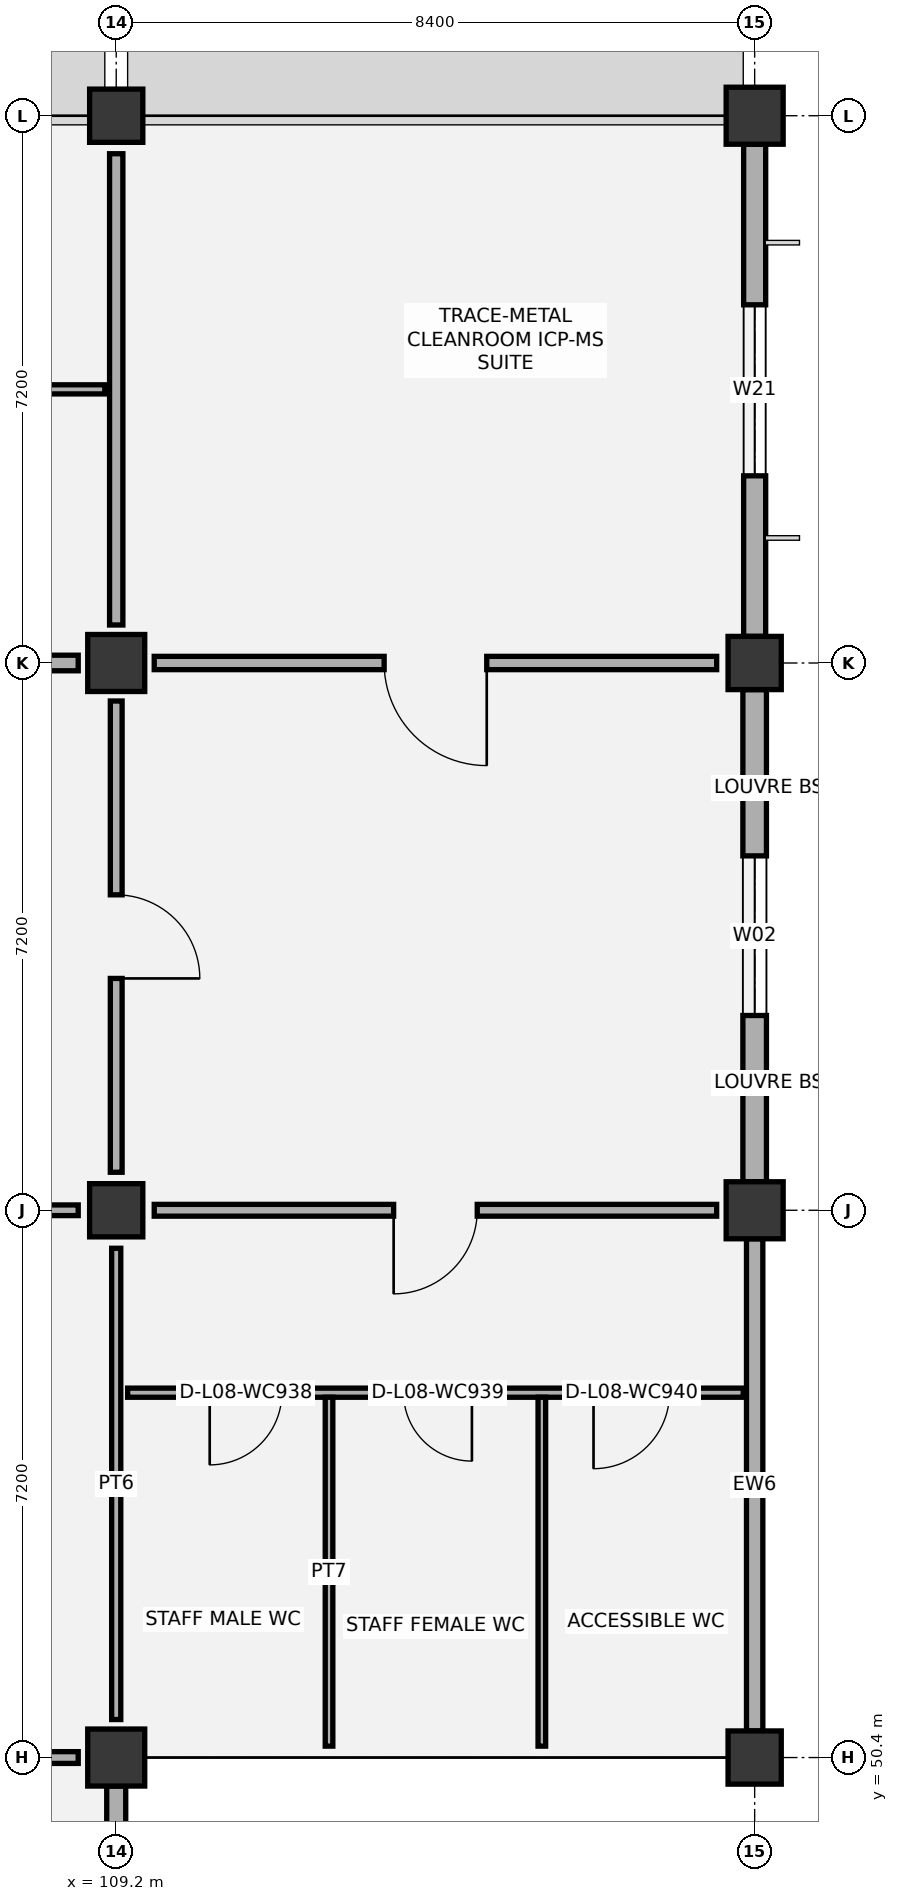
"""IFC4 building model, lengths in metres.
Left out: names, types, materials, properties, quantities, classifications, styles, units other than length and angle.
Written with IfcOpenShell. Run it as: python <this file> out.ifc"""

import sys

from ifc_helpers import new_model, si_unit, direction, frame, frame_2d, origin, origin_2d, place, context, subcontext, project, spatial, rectangle, extrude, element, fill, save


model = new_model("IFC4")
c1 = context("Model", 3, precision=1e-05, world=origin(), true_north=direction((0.0, 1.0)))
c2 = subcontext(c1, "Body", "Model", "MODEL_VIEW")
j1 = project(units=[si_unit("LENGTHUNIT", "METRE"), si_unit("PLANEANGLEUNIT", "RADIAN")], contexts=[c1])
p1 = place(None, origin())
s1 = spatial("IfcSite", under=j1, at=p1, CompositionType="ELEMENT")
p2 = place(p1, origin())
s2 = spatial("IfcBuilding", under=s1, at=p2, CompositionType="ELEMENT")
p3 = place(p2, frame((0.0, 0.0, 39.6)))
s3 = spatial("IfcBuildingStorey", under=s2, at=p3, CompositionType="ELEMENT", Elevation=39.6)
p4 = place(p3, frame((109.2, 50.4, 0.0), z_axis=(0.0, 0.0, 1.0), x_axis=(1.0, 0.0, 0.0)))
e1 = element("IfcColumn", 1, at=p4, inside=s3, PredefinedType="COLUMN", context=c2, shape_type="SweptSolid", body=[
    extrude(rectangle(XDim=0.75, YDim=0.75, at=origin_2d()), origin(), (0.0, 0.0, 1.0), 4.2),
])
p5 = place(p3, frame((109.2, 57.6, 0.0), z_axis=(0.0, 0.0, 1.0), x_axis=(1.0, 0.0, 0.0)))
e2 = element("IfcColumn", 2, at=p5, inside=s3, PredefinedType="COLUMN", context=c2, shape_type="SweptSolid", body=[
    extrude(rectangle(XDim=0.7, YDim=0.7, at=origin_2d()), origin(), (0.0, 0.0, 1.0), 4.2),
])
p6 = place(p3, frame((109.2, 64.8, 0.0), z_axis=(0.0, 0.0, 1.0), x_axis=(1.0, 0.0, 0.0)))
e3 = element("IfcColumn", 3, at=p6, inside=s3, PredefinedType="COLUMN", context=c2, shape_type="SweptSolid", body=[
    extrude(rectangle(XDim=0.75, YDim=0.75, at=origin_2d()), origin(), (0.0, 0.0, 1.0), 4.2),
])
for number, where, z_axis, x_axis in (
    (4, (109.2, 72.0, 0.0), (0.0, 0.0, 1.0), (1.0, 0.0, 0.0)),
    (5, (117.6, 50.4, 0.0), (0.0, 0.0, 1.0), (1.0, 0.0, 0.0)),
):
    element("IfcColumn", number, at=place(p3, frame(where, z_axis=z_axis, x_axis=x_axis)), inside=s3, PredefinedType="COLUMN", context=c2, shape_type="SweptSolid", body=[
        extrude(rectangle(XDim=0.7, YDim=0.7, at=origin_2d()), origin(), (0.0, 0.0, 1.0), 4.2),
    ])
p7 = place(p3, frame((117.6, 57.6, 0.0), z_axis=(0.0, 0.0, 1.0), x_axis=(1.0, 0.0, 0.0)))
e6 = element("IfcColumn", 6, at=p7, inside=s3, PredefinedType="COLUMN", context=c2, shape_type="SweptSolid", body=[
    extrude(rectangle(XDim=0.75, YDim=0.75, at=origin_2d()), origin(), (0.0, 0.0, 1.0), 4.2),
])
p8 = place(p3, frame((117.6, 64.8, 0.0), z_axis=(0.0, 0.0, 1.0), x_axis=(1.0, 0.0, 0.0)))
e7 = element("IfcColumn", 7, at=p8, inside=s3, PredefinedType="COLUMN", context=c2, shape_type="SweptSolid", body=[
    extrude(rectangle(XDim=0.7, YDim=0.7, at=origin_2d()), origin(), (0.0, 0.0, 1.0), 4.2),
])
p9 = place(p3, frame((117.6, 72.0, 0.0), z_axis=(0.0, 0.0, 1.0), x_axis=(1.0, 0.0, 0.0)))
e8 = element("IfcColumn", 8, at=p9, inside=s3, PredefinedType="COLUMN", context=c2, shape_type="SweptSolid", body=[
    extrude(rectangle(XDim=0.75, YDim=0.75, at=origin_2d()), origin(), (0.0, 0.0, 1.0), 4.2),
])
p10 = place(p3, frame((109.2, 43.55, 0.0), z_axis=(0.0, 0.0, 1.0), x_axis=(0.0, 1.0, 0.0)))
e9 = element("IfcWall", 9, at=p10, inside=s3, PredefinedType="SOLIDWALL", context=c2, shape_type="SweptSolid", body=[
    extrude(rectangle(XDim=6.475, YDim=0.25, at=frame_2d((3.237, 0.0))), origin(), (0.0, 0.0, 1.0), 3.345),
])
p11 = place(p10, frame((1.358, 0.0, 0.9)))
e10 = element("IfcOpeningElement", 10, at=p11, cuts=e9, PredefinedType="OPENING", context=c2, shape_type="SweptSolid", body=[
    extrude(rectangle(XDim=1.2, YDim=1.8, at=frame_2d((0.6, 0.9))), frame((0.0, 0.135, 0.0), z_axis=(0.0, -1.0, 0.0), x_axis=(1.0, 0.0, 0.0)), (0.0, 0.0, 1.0), 0.27),
])
p12 = place(p10, frame((3.917, 0.0, 0.9)))
e11 = element("IfcOpeningElement", 11, at=p12, cuts=e9, PredefinedType="OPENING", context=c2, shape_type="SweptSolid", body=[
    extrude(rectangle(XDim=1.2, YDim=1.8, at=frame_2d((0.6, 0.9))), frame((0.0, 0.135, 0.0), z_axis=(0.0, -1.0, 0.0), x_axis=(1.0, 0.0, 0.0)), (0.0, 0.0, 1.0), 0.27),
])
p13 = place(p3, frame((117.6, 50.75, 0.0), z_axis=(0.0, 0.0, 1.0), x_axis=(0.0, 1.0, 0.0)))
e12 = element("IfcWall", 12, at=p13, inside=s3, PredefinedType="SOLIDWALL", context=c2, shape_type="SweptSolid", body=[
    extrude(rectangle(XDim=6.475, YDim=0.215, at=frame_2d((3.238, 0.0))), origin(), (0.0, 0.0, 1.0), 3.345),
])
p14 = place(p3, frame((117.6, 57.975, 0.0), z_axis=(0.0, 0.0, 1.0), x_axis=(0.0, 1.0, 0.0)))
e13 = element("IfcWall", 13, at=p14, inside=s3, PredefinedType="SOLIDWALL", context=c2, shape_type="SweptSolid", body=[
    extrude(rectangle(XDim=6.475, YDim=0.31, at=frame_2d((3.237, 0.0))), origin(), (0.0, 0.0, 1.0), 3.345),
])
p15 = place(p14, frame((2.188, 0.0, 0.9)))
e14 = element("IfcOpeningElement", 14, at=p15, cuts=e13, PredefinedType="OPENING", context=c2, shape_type="SweptSolid", body=[
    extrude(rectangle(XDim=2.1, YDim=1.8, at=frame_2d((1.05, 0.9))), frame((0.0, 0.165, 0.0), z_axis=(0.0, -1.0, 0.0), x_axis=(1.0, 0.0, 0.0)), (0.0, 0.0, 1.0), 0.33),
])
p16 = place(p3, frame((117.6, 65.15, 0.0), z_axis=(0.0, 0.0, 1.0), x_axis=(0.0, 1.0, 0.0)))
e15 = element("IfcWall", 15, at=p16, inside=s3, PredefinedType="SOLIDWALL", context=c2, shape_type="SweptSolid", body=[
    extrude(rectangle(XDim=6.475, YDim=0.29, at=frame_2d((3.238, 0.0))), origin(), (0.0, 0.0, 1.0), 3.345),
])
p17 = place(p16, frame((2.113, 0.0, 0.9)))
e16 = element("IfcOpeningElement", 16, at=p17, cuts=e15, PredefinedType="OPENING", context=c2, shape_type="SweptSolid", body=[
    extrude(rectangle(XDim=2.25, YDim=1.95, at=frame_2d((1.125, 0.975))), frame((0.0, 0.155, 0.0), z_axis=(0.0, -1.0, 0.0), x_axis=(1.0, 0.0, 0.0)), (0.0, 0.0, 1.0), 0.31),
])
p18 = place(p3, frame((109.35, 55.2, 0.0), z_axis=(0.0, 0.0, 1.0), x_axis=(1.0, 0.0, 0.0)))
e17 = element("IfcWall", 17, at=p18, inside=s3, PredefinedType="PARTITIONING", context=c2, shape_type="SweptSolid", body=[
    extrude(rectangle(XDim=8.1, YDim=0.12, at=frame_2d((4.05, 0.0))), origin(), (0.0, 0.0, 1.0), 3.9),
])
p19 = place(p18, frame((1.08, 0.0, 0.0)))
e18 = element("IfcOpeningElement", 18, at=p19, cuts=e17, PredefinedType="OPENING", context=c2, shape_type="SweptSolid", body=[
    extrude(rectangle(XDim=0.95, YDim=2.1, at=frame_2d((0.475, 1.05))), frame((0.0, 0.07, 0.0), z_axis=(0.0, -1.0, 0.0), x_axis=(1.0, 0.0, 0.0)), (0.0, 0.0, 1.0), 0.14),
])
p20 = place(p18, frame((3.63, 0.0, 0.0)))
e19 = element("IfcOpeningElement", 19, at=p20, cuts=e17, PredefinedType="OPENING", context=c2, shape_type="SweptSolid", body=[
    extrude(rectangle(XDim=0.9, YDim=2.1, at=frame_2d((0.45, 1.05))), frame((0.0, 0.07, 0.0), z_axis=(0.0, -1.0, 0.0), x_axis=(1.0, 0.0, 0.0)), (0.0, 0.0, 1.0), 0.14),
])
p21 = place(p18, frame((6.13, 0.0, 0.0)))
e20 = element("IfcOpeningElement", 20, at=p21, cuts=e17, PredefinedType="OPENING", context=c2, shape_type="SweptSolid", body=[
    extrude(rectangle(XDim=1.0, YDim=2.1, at=frame_2d((0.5, 1.05))), frame((0.0, 0.07, 0.0), z_axis=(0.0, -1.0, 0.0), x_axis=(1.0, 0.0, 0.0)), (0.0, 0.0, 1.0), 0.14),
])
for number, where, z_axis, x_axis in (
    (21, (112.0, 50.55, 0.0), (0.0, 0.0, 1.0), (0.0, 1.0, 0.0)),
    (22, (114.8, 50.55, 0.0), (0.0, 0.0, 1.0), (0.0, 1.0, 0.0)),
):
    element("IfcWall", number, at=place(p3, frame(where, z_axis=z_axis, x_axis=x_axis)), inside=s3, PredefinedType="PARTITIONING", context=c2, shape_type="SweptSolid", body=[
        extrude(rectangle(XDim=4.59, YDim=0.1, at=frame_2d((2.295, 0.0))), origin(), (0.0, 0.0, 1.0), 3.9),
    ])
p22 = place(p3, frame((100.95, 68.4, 0.0), z_axis=(0.0, 0.0, 1.0), x_axis=(1.0, 0.0, 0.0)))
e23 = element("IfcWall", 23, at=p22, inside=s3, PredefinedType="PARTITIONING", context=c2, shape_type="SweptSolid", body=[
    extrude(rectangle(XDim=8.1, YDim=0.12, at=frame_2d((4.05, 0.0))), origin(), (0.0, 0.0, 1.0), 3.9),
])
p23 = place(p22, frame((3.55, 0.0, 0.0)))
e24 = element("IfcOpeningElement", 24, at=p23, cuts=e23, PredefinedType="OPENING", context=c2, shape_type="SweptSolid", body=[
    extrude(rectangle(XDim=1.6, YDim=2.2, at=frame_2d((0.8, 1.1))), frame((0.0, 0.07, 0.0), z_axis=(0.0, -1.0, 0.0), x_axis=(1.0, 0.0, 0.0)), (0.0, 0.0, 1.0), 0.14),
])
p24 = place(p3, frame((101.3, 50.4, 0.0), z_axis=(0.0, 0.0, 1.0), x_axis=(1.0, 0.0, 0.0)))
e25 = element("IfcWall", 25, at=p24, inside=s3, PredefinedType="PARTITIONING", context=c2, shape_type="SweptSolid", body=[
    extrude(rectangle(XDim=7.4, YDim=0.155, at=frame_2d((3.7, 0.0))), origin(), (0.0, 0.0, 1.0), 3.295),
])
p25 = place(p24, frame((3.15, 0.0, 0.0)))
e26 = element("IfcOpeningElement", 26, at=p25, cuts=e25, PredefinedType="OPENING", context=c2, shape_type="SweptSolid", body=[
    extrude(rectangle(XDim=1.1, YDim=2.1, at=frame_2d((0.55, 1.05))), frame((0.0, 0.087, 0.0), z_axis=(0.0, -1.0, 0.0), x_axis=(1.0, 0.0, 0.0)), (0.0, 0.0, 1.0), 0.175),
])
p26 = place(p3, frame((109.2, 50.9, 0.0), z_axis=(0.0, 0.0, 1.0), x_axis=(0.0, 1.0, 0.0)))
e27 = element("IfcWall", 27, at=p26, inside=s3, PredefinedType="PARTITIONING", context=c2, shape_type="SweptSolid", body=[
    extrude(rectangle(XDim=6.2, YDim=0.12, at=frame_2d((3.1, 0.0))), origin(), (0.0, 0.0, 1.0), 3.395),
])
p27 = place(p3, frame((101.3, 57.6, 0.0), z_axis=(0.0, 0.0, 1.0), x_axis=(1.0, 0.0, 0.0)))
e28 = element("IfcWall", 28, at=p27, inside=s3, PredefinedType="PARTITIONING", context=c2, shape_type="SweptSolid", body=[
    extrude(rectangle(XDim=7.4, YDim=0.14, at=frame_2d((3.7, 0.0))), origin(), (0.0, 0.0, 1.0), 3.295),
])
p28 = place(p27, frame((3.125, 0.0, 0.0)))
e29 = element("IfcOpeningElement", 29, at=p28, cuts=e28, PredefinedType="OPENING", context=c2, shape_type="SweptSolid", body=[
    extrude(rectangle(XDim=1.15, YDim=2.1, at=frame_2d((0.575, 1.05))), frame((0.0, 0.08, 0.0), z_axis=(0.0, -1.0, 0.0), x_axis=(1.0, 0.0, 0.0)), (0.0, 0.0, 1.0), 0.16),
])
p29 = place(p3, frame((109.2, 58.1, 0.0), z_axis=(0.0, 0.0, 1.0), x_axis=(0.0, 1.0, 0.0)))
e30 = element("IfcWall", 30, at=p29, inside=s3, PredefinedType="PARTITIONING", context=c2, shape_type="SweptSolid", body=[
    extrude(rectangle(XDim=6.2, YDim=0.155, at=frame_2d((3.1, 0.0))), origin(), (0.0, 0.0, 1.0), 3.345),
])
p30 = place(p29, frame((2.55, 0.0, 0.0)))
e31 = element("IfcOpeningElement", 31, at=p30, cuts=e30, PredefinedType="OPENING", context=c2, shape_type="SweptSolid", body=[
    extrude(rectangle(XDim=1.1, YDim=2.1, at=frame_2d((0.55, 1.05))), frame((0.0, 0.087, 0.0), z_axis=(0.0, -1.0, 0.0), x_axis=(1.0, 0.0, 0.0)), (0.0, 0.0, 1.0), 0.175),
])
p31 = place(p3, frame((101.3, 64.8, 0.0), z_axis=(0.0, 0.0, 1.0), x_axis=(1.0, 0.0, 0.0)))
e32 = element("IfcWall", 32, at=p31, inside=s3, PredefinedType="PARTITIONING", context=c2, shape_type="SweptSolid", body=[
    extrude(rectangle(XDim=7.4, YDim=0.205, at=frame_2d((3.7, 0.0))), origin(), (0.0, 0.0, 1.0), 3.295),
])
p32 = place(p31, frame((3.05, 0.0, 0.0)))
e33 = element("IfcOpeningElement", 33, at=p32, cuts=e32, PredefinedType="OPENING", context=c2, shape_type="SweptSolid", body=[
    extrude(rectangle(XDim=1.3, YDim=2.15, at=frame_2d((0.65, 1.075))), frame((0.0, 0.113, 0.0), z_axis=(0.0, -1.0, 0.0), x_axis=(1.0, 0.0, 0.0)), (0.0, 0.0, 1.0), 0.225),
])
p33 = place(p3, frame((109.2, 65.3, 0.0), z_axis=(0.0, 0.0, 1.0), x_axis=(0.0, 1.0, 0.0)))
e34 = element("IfcWall", 34, at=p33, inside=s3, PredefinedType="PARTITIONING", context=c2, shape_type="SweptSolid", body=[
    extrude(rectangle(XDim=6.2, YDim=0.175, at=frame_2d((3.1, 0.0))), origin(), (0.0, 0.0, 1.0), 3.495),
])
p34 = place(p3, frame((109.7, 57.6, 0.0), z_axis=(0.0, 0.0, 1.0), x_axis=(1.0, 0.0, 0.0)))
e35 = element("IfcWall", 35, at=p34, inside=s3, PredefinedType="PARTITIONING", context=c2, shape_type="SweptSolid", body=[
    extrude(rectangle(XDim=7.4, YDim=0.155, at=frame_2d((3.7, 0.0))), origin(), (0.0, 0.0, 1.0), 3.295),
])
p35 = place(p34, frame((3.15, 0.0, 0.0)))
e36 = element("IfcOpeningElement", 36, at=p35, cuts=e35, PredefinedType="OPENING", context=c2, shape_type="SweptSolid", body=[
    extrude(rectangle(XDim=1.1, YDim=2.1, at=frame_2d((0.55, 1.05))), frame((0.0, 0.087, 0.0), z_axis=(0.0, -1.0, 0.0), x_axis=(1.0, 0.0, 0.0)), (0.0, 0.0, 1.0), 0.175),
])
p36 = place(p3, frame((109.7, 64.8, 0.0), z_axis=(0.0, 0.0, 1.0), x_axis=(1.0, 0.0, 0.0)))
e37 = element("IfcWall", 37, at=p36, inside=s3, PredefinedType="PARTITIONING", context=c2, shape_type="SweptSolid", body=[
    extrude(rectangle(XDim=7.4, YDim=0.175, at=frame_2d((3.7, 0.0))), origin(), (0.0, 0.0, 1.0), 3.295),
])
p37 = place(p36, frame((3.025, 0.0, 0.0)))
e38 = element("IfcOpeningElement", 38, at=p37, cuts=e37, PredefinedType="OPENING", context=c2, shape_type="SweptSolid", body=[
    extrude(rectangle(XDim=1.35, YDim=2.15, at=frame_2d((0.675, 1.075))), frame((0.0, 0.097, 0.0), z_axis=(0.0, -1.0, 0.0), x_axis=(1.0, 0.0, 0.0)), (0.0, 0.0, 1.0), 0.195),
])
p38 = place(p15, origin())
e39 = element("IfcWindow", 39, at=p38, inside=s3, PartitioningType="SINGLE_PANEL", PredefinedType="WINDOW", context=c2, shape_type="SweptSolid", body=[
    extrude(rectangle(XDim=2.1, YDim=1.8, at=frame_2d((1.05, 0.9))), frame((0.0, 0.03, 0.0), z_axis=(0.0, -1.0, 0.0), x_axis=(1.0, 0.0, 0.0)), (0.0, 0.0, 1.0), 0.06),
])
fill(e14, e39)
p39 = place(p17, origin())
e40 = element("IfcWindow", 40, at=p39, inside=s3, PartitioningType="SINGLE_PANEL", PredefinedType="WINDOW", context=c2, shape_type="SweptSolid", body=[
    extrude(rectangle(XDim=2.25, YDim=1.95, at=frame_2d((1.125, 0.975))), frame((0.0, 0.03, 0.0), z_axis=(0.0, -1.0, 0.0), x_axis=(1.0, 0.0, 0.0)), (0.0, 0.0, 1.0), 0.06),
])
fill(e16, e40)
p40 = place(p19, frame((0.95, 0.0, 0.0), z_axis=(0.0, 0.0, 1.0), x_axis=(-1.0, 0.0, 0.0)))
e41 = element("IfcDoor", 41, at=p40, inside=s3, OperationType="SINGLE_SWING_RIGHT", PredefinedType="DOOR", context=c2, shape_type="SweptSolid", body=[
    extrude(rectangle(XDim=0.95, YDim=2.1, at=frame_2d((0.475, 1.05))), frame((0.0, 0.025, 0.0), z_axis=(0.0, -1.0, 0.0), x_axis=(1.0, 0.0, 0.0)), (0.0, 0.0, 1.0), 0.05),
])
fill(e18, e41)
p41 = place(p20, frame((0.9, 0.0, 0.0), z_axis=(0.0, 0.0, 1.0), x_axis=(-1.0, 0.0, 0.0)))
e42 = element("IfcDoor", 42, at=p41, inside=s3, OperationType="SINGLE_SWING_LEFT", PredefinedType="DOOR", context=c2, shape_type="SweptSolid", body=[
    extrude(rectangle(XDim=0.9, YDim=2.1, at=frame_2d((0.45, 1.05))), frame((0.0, 0.025, 0.0), z_axis=(0.0, -1.0, 0.0), x_axis=(1.0, 0.0, 0.0)), (0.0, 0.0, 1.0), 0.05),
])
fill(e19, e42)
p42 = place(p21, frame((1.0, 0.0, 0.0), z_axis=(0.0, 0.0, 1.0), x_axis=(-1.0, 0.0, 0.0)))
e43 = element("IfcDoor", 43, at=p42, inside=s3, OperationType="SINGLE_SWING_RIGHT", PredefinedType="DOOR", context=c2, shape_type="SweptSolid", body=[
    extrude(rectangle(XDim=1.0, YDim=2.1, at=frame_2d((0.5, 1.05))), frame((0.0, 0.025, 0.0), z_axis=(0.0, -1.0, 0.0), x_axis=(1.0, 0.0, 0.0)), (0.0, 0.0, 1.0), 0.05),
])
fill(e20, e43)
p43 = place(p30, frame((1.1, 0.0, 0.0), z_axis=(0.0, 0.0, 1.0), x_axis=(-1.0, 0.0, 0.0)))
e44 = element("IfcDoor", 44, at=p43, inside=s3, OperationType="SINGLE_SWING_RIGHT", PredefinedType="DOOR", context=c2, shape_type="SweptSolid", body=[
    extrude(rectangle(XDim=1.1, YDim=2.1, at=frame_2d((0.55, 1.05))), frame((0.0, 0.025, 0.0), z_axis=(0.0, -1.0, 0.0), x_axis=(1.0, 0.0, 0.0)), (0.0, 0.0, 1.0), 0.05),
])
fill(e31, e44)
p44 = place(p35, frame((1.1, 0.0, 0.0), z_axis=(0.0, 0.0, 1.0), x_axis=(-1.0, 0.0, 0.0)))
e45 = element("IfcDoor", 45, at=p44, inside=s3, OperationType="SINGLE_SWING_RIGHT", PredefinedType="DOOR", context=c2, shape_type="SweptSolid", body=[
    extrude(rectangle(XDim=1.1, YDim=2.1, at=frame_2d((0.55, 1.05))), frame((0.0, 0.025, 0.0), z_axis=(0.0, -1.0, 0.0), x_axis=(1.0, 0.0, 0.0)), (0.0, 0.0, 1.0), 0.05),
])
fill(e36, e45)
p45 = place(p37, frame((1.35, 0.0, 0.0), z_axis=(0.0, 0.0, 1.0), x_axis=(-1.0, 0.0, 0.0)))
e46 = element("IfcDoor", 46, at=p45, inside=s3, OperationType="SINGLE_SWING_LEFT", PredefinedType="DOOR", context=c2, shape_type="SweptSolid", body=[
    extrude(rectangle(XDim=1.35, YDim=2.15, at=frame_2d((0.675, 1.075))), frame((0.0, 0.025, 0.0), z_axis=(0.0, -1.0, 0.0), x_axis=(1.0, 0.0, 0.0)), (0.0, 0.0, 1.0), 0.05),
])
fill(e38, e46)
save(model, sys.argv[1])
